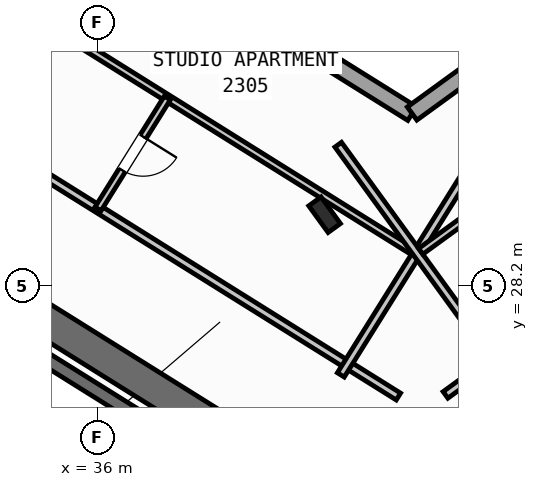
"""IFC4 building model, lengths in metres.
Left out: names, types, materials, properties, quantities, classifications, styles, units other than length and angle.
Written with IfcOpenShell. Run it as: python <this file> out.ifc"""

import sys

from ifc_helpers import new_model, si_unit, direction, frame, frame_2d, origin, origin_2d, place, context, subcontext, project, spatial, rectangle, i_section, extrude, source, transform, mapped, element, fill, save


model = new_model("IFC4")
c1 = context("Model", 3, precision=1e-05, world=origin(), true_north=direction((0.0, 1.0)))
c2 = subcontext(c1, "Body", "Model", "MODEL_VIEW")
j1 = project(units=[si_unit("LENGTHUNIT", "METRE"), si_unit("PLANEANGLEUNIT", "RADIAN")], contexts=[c1])
p1 = place(None, origin())
s1 = spatial("IfcSite", under=j1, at=p1, CompositionType="ELEMENT")
p2 = place(p1, origin())
s2 = spatial("IfcBuilding", under=s1, at=p2, CompositionType="ELEMENT")
p3 = place(p2, frame((0.0, 0.0, 93.6)))
s3 = spatial("IfcBuildingStorey", under=s2, at=p3, CompositionType="ELEMENT", Elevation=93.6)
p4 = place(p3, frame((40.615, 23.983, 0.0), z_axis=(0.0, 0.0, 1.0), x_axis=(-0.848045953968, 0.529922692436, 0.0)))
e1 = element("IfcWall", 1, at=p4, inside=s3, PredefinedType="SHEAR", context=c2, shape_type="SweptSolid", body=[
    extrude(rectangle(XDim=13.24, YDim=0.65, at=frame_2d((6.62, 0.0))), origin(), (0.0, 0.0, 1.0), 3.35),
])
m1 = source(origin(), c2, "Body", "SweptSolid", [
    extrude(i_section(OverallWidth=0.3, OverallDepth=0.65, WebThickness=0.016, FlangeThickness=0.031, at=origin_2d()), origin(), (0.0, 0.0, 1.0), 3.6),
])
p5 = place(p3, frame((40.479, 29.601, 0.0), z_axis=(0.0, 0.0, 1.0), x_axis=(0.809016994375, 0.587785252292, 0.0)))
e2 = element("IfcColumn", 2, at=p5, inside=s3, PredefinedType="COLUMN", context=c2, shape_type="MappedRepresentation", body=[
    mapped(m1, transform((0.0, 0.0, 0.0), scale=1.0)),
])
p6 = place(p3, frame((17.424, 47.083, 0.0), z_axis=(0.0, 0.0, 1.0), x_axis=(0.848049927979, -0.529916332693, 0.0)))
e3 = element("IfcWall", 3, at=p6, inside=s3, PredefinedType="STANDARD", context=c2, shape_type="SweptSolid", body=[
    extrude(rectangle(XDim=29.223, YDim=0.32, at=frame_2d((14.612, 0.0))), origin(), (0.0, 0.0, 1.0), 3.35),
])
p7 = place(p6, frame((3.745, 0.0, 0.0)))
e4 = element("IfcOpeningElement", 4, at=p7, cuts=e3, PredefinedType="OPENING", context=c2, shape_type="SweptSolid", body=[
    extrude(rectangle(XDim=1.05, YDim=2.15, at=frame_2d((0.525, 1.075))), frame((0.0, 0.17, 0.0), z_axis=(0.0, -1.0, 0.0), x_axis=(1.0, 0.0, 0.0)), (0.0, 0.0, 1.0), 0.34),
])
p8 = place(p6, frame((0.699, 0.0, 0.95)))
e5 = element("IfcOpeningElement", 5, at=p8, cuts=e3, PredefinedType="OPENING", context=c2, shape_type="SweptSolid", body=[
    extrude(rectangle(XDim=1.2, YDim=1.4, at=frame_2d((0.6, 0.7))), frame((0.0, 0.17, 0.0), z_axis=(0.0, -1.0, 0.0), x_axis=(1.0, 0.0, 0.0)), (0.0, 0.0, 1.0), 0.34),
])
p9 = place(p6, frame((6.951, 0.0, 1.0)))
e6 = element("IfcOpeningElement", 6, at=p9, cuts=e3, PredefinedType="OPENING", context=c2, shape_type="SweptSolid", body=[
    extrude(rectangle(XDim=0.9, YDim=1.25, at=frame_2d((0.45, 0.625))), frame((0.0, 0.17, 0.0), z_axis=(0.0, -1.0, 0.0), x_axis=(1.0, 0.0, 0.0)), (0.0, 0.0, 1.0), 0.34),
])
p10 = place(p6, frame((9.841, 0.0, 0.85)))
e7 = element("IfcOpeningElement", 7, at=p10, cuts=e3, PredefinedType="OPENING", context=c2, shape_type="SweptSolid", body=[
    extrude(rectangle(XDim=1.5, YDim=1.5, at=frame_2d((0.75, 0.75))), frame((0.0, 0.17, 0.0), z_axis=(0.0, -1.0, 0.0), x_axis=(1.0, 0.0, 0.0)), (0.0, 0.0, 1.0), 0.34),
])
p11 = place(p6, frame((13.889, 0.0, 0.95)))
e8 = element("IfcOpeningElement", 8, at=p11, cuts=e3, PredefinedType="OPENING", context=c2, shape_type="SweptSolid", body=[
    extrude(rectangle(XDim=1.2, YDim=1.4, at=frame_2d((0.6, 0.7))), frame((0.0, 0.17, 0.0), z_axis=(0.0, -1.0, 0.0), x_axis=(1.0, 0.0, 0.0)), (0.0, 0.0, 1.0), 0.34),
])
p12 = place(p6, frame((17.254, 0.0, 1.0)))
e9 = element("IfcOpeningElement", 9, at=p12, cuts=e3, PredefinedType="OPENING", context=c2, shape_type="SweptSolid", body=[
    extrude(rectangle(XDim=0.9, YDim=1.25, at=frame_2d((0.45, 0.625))), frame((0.0, 0.17, 0.0), z_axis=(0.0, -1.0, 0.0), x_axis=(1.0, 0.0, 0.0)), (0.0, 0.0, 1.0), 0.34),
])
p13 = place(p6, frame((20.764, 0.0, 0.8)))
e10 = element("IfcOpeningElement", 10, at=p13, cuts=e3, PredefinedType="OPENING", context=c2, shape_type="SweptSolid", body=[
    extrude(rectangle(XDim=2.1, YDim=1.55, at=frame_2d((1.05, 0.775))), frame((0.0, 0.17, 0.0), z_axis=(0.0, -1.0, 0.0), x_axis=(1.0, 0.0, 0.0)), (0.0, 0.0, 1.0), 0.34),
])
p14 = place(p6, frame((25.403, 0.0, 0.8)))
e11 = element("IfcOpeningElement", 11, at=p14, cuts=e3, PredefinedType="OPENING", context=c2, shape_type="SweptSolid", body=[
    extrude(rectangle(XDim=2.1, YDim=1.55, at=frame_2d((1.05, 0.775))), frame((0.0, 0.17, 0.0), z_axis=(0.0, -1.0, 0.0), x_axis=(1.0, 0.0, 0.0)), (0.0, 0.0, 1.0), 0.34),
])
p15 = place(p3, frame((42.207, 31.597, 0.0), z_axis=(0.0, 0.0, 1.0), x_axis=(0.809020333377, 0.587780656523, 0.0)))
e12 = element("IfcWall", 12, at=p15, inside=s3, PredefinedType="STANDARD", context=c2, shape_type="SweptSolid", body=[
    extrude(rectangle(XDim=15.223, YDim=0.32, at=frame_2d((7.611, 0.0))), origin(), (0.0, 0.0, 1.0), 3.35),
])
p16 = place(p15, frame((12.82, 0.0, 0.0)))
e13 = element("IfcOpeningElement", 13, at=p16, cuts=e12, PredefinedType="OPENING", context=c2, shape_type="SweptSolid", body=[
    extrude(rectangle(XDim=1.05, YDim=2.15, at=frame_2d((0.525, 1.075))), frame((0.0, 0.17, 0.0), z_axis=(0.0, -1.0, 0.0), x_axis=(1.0, 0.0, 0.0)), (0.0, 0.0, 1.0), 0.34),
])
p17 = place(p15, frame((1.52, 0.0, 0.8)))
e14 = element("IfcOpeningElement", 14, at=p17, cuts=e12, PredefinedType="OPENING", context=c2, shape_type="SweptSolid", body=[
    extrude(rectangle(XDim=2.1, YDim=1.55, at=frame_2d((1.05, 0.775))), frame((0.0, 0.17, 0.0), z_axis=(0.0, -1.0, 0.0), x_axis=(1.0, 0.0, 0.0)), (0.0, 0.0, 1.0), 0.34),
])
p18 = place(p15, frame((5.76, 0.0, 0.8)))
e15 = element("IfcOpeningElement", 15, at=p18, cuts=e12, PredefinedType="OPENING", context=c2, shape_type="SweptSolid", body=[
    extrude(rectangle(XDim=2.1, YDim=1.55, at=frame_2d((1.05, 0.775))), frame((0.0, 0.17, 0.0), z_axis=(0.0, -1.0, 0.0), x_axis=(1.0, 0.0, 0.0)), (0.0, 0.0, 1.0), 0.34),
])
p19 = place(p15, frame((10.219, 0.0, 1.0)))
e16 = element("IfcOpeningElement", 16, at=p19, cuts=e12, PredefinedType="OPENING", context=c2, shape_type="SweptSolid", body=[
    extrude(rectangle(XDim=0.9, YDim=1.25, at=frame_2d((0.45, 0.625))), frame((0.0, 0.17, 0.0), z_axis=(0.0, -1.0, 0.0), x_axis=(1.0, 0.0, 0.0)), (0.0, 0.0, 1.0), 0.34),
])
p20 = place(p3, frame((39.721, 23.788, 0.0), z_axis=(0.0, 0.0, 1.0), x_axis=(-0.848054434086, 0.529909121291, 0.0)))
e17 = element("IfcWall", 17, at=p20, inside=s3, PredefinedType="SHEAR", context=c2, shape_type="SweptSolid", body=[
    extrude(rectangle(XDim=7.33, YDim=0.26, at=frame_2d((3.665, 0.0))), origin(), (0.0, 0.0, 1.0), 3.35),
])
p21 = place(p3, frame((41.936, 26.012, 0.0), z_axis=(0.0, 0.0, 1.0), x_axis=(-0.848051154596, 0.529914369676, 0.0)))
e18 = element("IfcWall", 18, at=p21, inside=s3, PredefinedType="PARTITIONING", context=c2, shape_type="SweptSolid", body=[
    extrude(rectangle(XDim=15.57, YDim=0.16, at=frame_2d((7.785, 0.0))), origin(), (0.0, 0.0, 1.0), 3.34),
])
p22 = place(p21, frame((10.83, 0.0, 0.0)))
e19 = element("IfcOpeningElement", 19, at=p22, cuts=e18, PredefinedType="OPENING", context=c2, shape_type="SweptSolid", body=[
    extrude(rectangle(XDim=1.0, YDim=2.1, at=frame_2d((0.5, 1.05))), frame((0.0, 0.09, 0.0), z_axis=(0.0, -1.0, 0.0), x_axis=(1.0, 0.0, 0.0)), (0.0, 0.0, 1.0), 0.18),
])
p23 = place(p3, frame((43.704, 31.086, 0.0), z_axis=(0.0, 0.0, 1.0), x_axis=(-0.529906828443, -0.848055866774, 0.0)))
e20 = element("IfcWall", 20, at=p23, inside=s3, PredefinedType="PARTITIONING", context=c2, shape_type="SweptSolid", body=[
    extrude(rectangle(XDim=5.48, YDim=0.16, at=frame_2d((2.74, 0.0))), origin(), (0.0, 0.0, 1.0), 3.34),
])
p24 = place(p3, frame((42.226, 28.873, 0.0), z_axis=(0.0, 0.0, 1.0), x_axis=(-0.848049134363, 0.529917602752, 0.0)))
e21 = element("IfcWall", 21, at=p24, inside=s3, PredefinedType="PLUMBINGWALL", context=c2, shape_type="SweptSolid", body=[
    extrude(rectangle(XDim=14.3, YDim=0.14, at=frame_2d((7.15, 0.0))), origin(), (0.0, 0.0, 1.0), 3.34),
])
p25 = place(p24, frame((9.57, 0.0, 0.0)))
e22 = element("IfcOpeningElement", 22, at=p25, cuts=e21, PredefinedType="OPENING", context=c2, shape_type="SweptSolid", body=[
    extrude(rectangle(XDim=0.92, YDim=2.08, at=frame_2d((0.46, 1.04))), frame((0.0, 0.08, 0.0), z_axis=(0.0, -1.0, 0.0), x_axis=(1.0, 0.0, 0.0)), (0.0, 0.0, 1.0), 0.16),
])
p26 = place(p3, frame((37.375, 31.904, 0.0), z_axis=(0.0, 0.0, 1.0), x_axis=(-0.529913878929, -0.848051461244, 0.0)))
e23 = element("IfcWall", 23, at=p26, inside=s3, PredefinedType="PLUMBINGWALL", context=c2, shape_type="SweptSolid", body=[
    extrude(rectangle(XDim=2.58, YDim=0.14, at=frame_2d((1.29, 0.0))), origin(), (0.0, 0.0, 1.0), 3.34),
])
p27 = place(p26, frame((0.9, 0.0, 0.0)))
e24 = element("IfcOpeningElement", 24, at=p27, cuts=e23, PredefinedType="OPENING", context=c2, shape_type="SweptSolid", body=[
    extrude(rectangle(XDim=0.78, YDim=2.05, at=frame_2d((0.39, 1.025))), frame((0.0, 0.08, 0.0), z_axis=(0.0, -1.0, 0.0), x_axis=(1.0, 0.0, 0.0)), (0.0, 0.0, 1.0), 0.16),
])
p28 = place(p3, frame((42.866, 26.044, 0.0), z_axis=(0.0, 0.0, 1.0), x_axis=(0.809020254154, 0.587780765566, 0.0)))
e25 = element("IfcWall", 25, at=p28, inside=s3, PredefinedType="PARTITIONING", context=c2, shape_type="SweptSolid", body=[
    extrude(rectangle(XDim=14.67, YDim=0.16, at=frame_2d((7.335, 0.0))), origin(), (0.0, 0.0, 1.0), 3.34),
])
p29 = place(p28, frame((10.2, 0.0, 0.0)))
e26 = element("IfcOpeningElement", 26, at=p29, cuts=e25, PredefinedType="OPENING", context=c2, shape_type="SweptSolid", body=[
    extrude(rectangle(XDim=1.0, YDim=2.1, at=frame_2d((0.5, 1.05))), frame((0.0, 0.09, 0.0), z_axis=(0.0, -1.0, 0.0), x_axis=(1.0, 0.0, 0.0)), (0.0, 0.0, 1.0), 0.18),
])
p30 = place(p3, frame((43.969, 26.55, 0.0), z_axis=(0.0, 0.0, 1.0), x_axis=(-0.587776919386, 0.80902304852, 0.0)))
e27 = element("IfcWall", 27, at=p30, inside=s3, PredefinedType="PARTITIONING", context=c2, shape_type="SweptSolid", body=[
    extrude(rectangle(XDim=5.48, YDim=0.16, at=frame_2d((2.74, 0.0))), origin(), (0.0, 0.0, 1.0), 3.34),
])
p31 = place(p3, frame((42.377, 28.878, 0.0), z_axis=(0.0, 0.0, 1.0), x_axis=(0.809020411523, 0.587780548963, 0.0)))
e28 = element("IfcWall", 28, at=p31, inside=s3, PredefinedType="PLUMBINGWALL", context=c2, shape_type="SweptSolid", body=[
    extrude(rectangle(XDim=13.4, YDim=0.14, at=frame_2d((6.7, 0.0))), origin(), (0.0, 0.0, 1.0), 3.34),
])
p32 = place(p31, frame((8.94, 0.0, 0.0)))
e29 = element("IfcOpeningElement", 29, at=p32, cuts=e28, PredefinedType="OPENING", context=c2, shape_type="SweptSolid", body=[
    extrude(rectangle(XDim=0.92, YDim=2.08, at=frame_2d((0.46, 1.04))), frame((0.0, 0.08, 0.0), z_axis=(0.0, -1.0, 0.0), x_axis=(1.0, 0.0, 0.0)), (0.0, 0.0, 1.0), 0.16),
])
m2 = source(origin(), c2, "Body", "SweptSolid", [
    extrude(rectangle(XDim=2.1, YDim=1.55, at=frame_2d((1.05, 0.775))), frame((0.0, 0.03, 0.0), z_axis=(0.0, -1.0, 0.0), x_axis=(1.0, 0.0, 0.0)), (0.0, 0.0, 1.0), 0.06),
])
p33 = place(p14, origin())
e30 = element("IfcWindow", 30, at=p33, inside=s3, PartitioningType="SINGLE_PANEL", PredefinedType="WINDOW", context=c2, shape_type="MappedRepresentation", body=[
    mapped(m2, transform((0.0, 0.0, 0.0), scale=1.0)),
])
fill(e11, e30)
m3 = source(origin(), c2, "Body", "SweptSolid", [
    extrude(rectangle(XDim=0.78, YDim=2.05, at=frame_2d((0.39, 1.025))), frame((0.0, 0.025, 0.0), z_axis=(0.0, -1.0, 0.0), x_axis=(1.0, 0.0, 0.0)), (0.0, 0.0, 1.0), 0.05),
])
p34 = place(p27, origin())
e31 = element("IfcDoor", 31, at=p34, inside=s3, OperationType="SINGLE_SWING_LEFT", PredefinedType="DOOR", context=c2, shape_type="MappedRepresentation", body=[
    mapped(m3, transform((0.0, 0.0, 0.0), scale=1.0)),
])
fill(e24, e31)
save(model, sys.argv[1])
